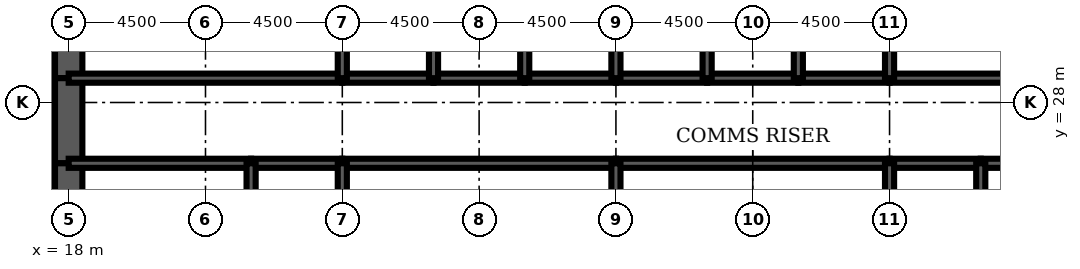
"""IFC4 building model, lengths in metres.
Left out: names, types, materials, properties, quantities, classifications, styles, units other than length and angle.
Written with IfcOpenShell. Run it as: python <this file> out.ifc"""

import sys

from ifc_helpers import new_model, si_unit, direction, frame, frame_2d, origin, place, context, subcontext, project, spatial, rectangle, extrude, element, fill, save


model = new_model("IFC4")
c1 = context("Model", 3, precision=1e-05, world=origin(), true_north=direction((0.0, 1.0)))
c2 = subcontext(c1, "Body", "Model", "MODEL_VIEW")
j1 = project(units=[si_unit("LENGTHUNIT", "METRE"), si_unit("PLANEANGLEUNIT", "RADIAN")], contexts=[c1])
p1 = place(None, origin())
s1 = spatial("IfcSite", under=j1, at=p1, CompositionType="ELEMENT")
p2 = place(p1, origin())
s2 = spatial("IfcBuilding", under=s1, at=p2, CompositionType="ELEMENT")
p3 = place(p2, frame((0.0, 0.0, 167.7)))
s3 = spatial("IfcBuildingStorey", under=s2, at=p3, CompositionType="ELEMENT", Elevation=167.7)
p4 = place(p3, frame((18.0, 32.0, 0.0), z_axis=(0.0, 0.0, 1.0), x_axis=(0.0, -1.0, 0.0)))
e1 = element("IfcWall", 1, at=p4, inside=s3, PredefinedType="SHEAR", context=c2, shape_type="SweptSolid", body=[
    extrude(rectangle(XDim=3.2, YDim=0.9, at=frame_2d((1.6, 0.0))), origin(), (0.0, 0.0, 1.0), 4.2),
])
p5 = place(p3, frame((18.0, 28.8, 0.0), z_axis=(0.0, 0.0, 1.0), x_axis=(0.0, -1.0, 0.0)))
e2 = element("IfcWall", 2, at=p5, inside=s3, PredefinedType="SHEAR", context=c2, shape_type="SweptSolid", body=[
    extrude(rectangle(XDim=2.8, YDim=0.9, at=frame_2d((1.4, 0.0))), origin(), (0.0, 0.0, 1.0), 4.2),
])
p6 = place(p5, frame((0.4, 0.0, 0.0)))
e3 = element("IfcOpeningElement", 3, at=p6, cuts=e2, PredefinedType="OPENING", context=c2, shape_type="SweptSolid", body=[
    extrude(rectangle(XDim=1.8, YDim=2.1, at=frame_2d((0.9, 1.05))), frame((0.0, 0.46, 0.0), z_axis=(0.0, -1.0, 0.0), x_axis=(1.0, 0.0, 0.0)), (0.0, 0.0, 1.0), 0.92),
])
p7 = place(p3, frame((18.0, 26.0, 0.0), z_axis=(0.0, 0.0, 1.0), x_axis=(0.0, -1.0, 0.0)))
e4 = element("IfcWall", 4, at=p7, inside=s3, PredefinedType="SHEAR", context=c2, shape_type="SweptSolid", body=[
    extrude(rectangle(XDim=4.0, YDim=0.9, at=frame_2d((2.0, 0.0))), origin(), (0.0, 0.0, 1.0), 4.2),
])
p8 = place(p3, frame((18.0, 28.8, 0.0), z_axis=(0.0, 0.0, 1.0), x_axis=(1.0, 0.0, 0.0)))
e5 = element("IfcWall", 5, at=p8, inside=s3, PredefinedType="SOLIDWALL", context=c2, shape_type="SweptSolid", body=[
    extrude(rectangle(XDim=9.0, YDim=0.3, at=frame_2d((4.5, 0.0))), origin(), (0.0, 0.0, 1.0), 4.2),
])
p9 = place(p8, frame((0.65, 0.0, 0.0)))
e6 = element("IfcOpeningElement", 6, at=p9, cuts=e5, PredefinedType="OPENING", context=c2, shape_type="SweptSolid", body=[
    extrude(rectangle(XDim=1.0, YDim=2.1, at=frame_2d((0.5, 1.05))), frame((0.0, 0.16, 0.0), z_axis=(0.0, -1.0, 0.0), x_axis=(1.0, 0.0, 0.0)), (0.0, 0.0, 1.0), 0.32),
])
p10 = place(p3, frame((27.0, 28.8, 0.0), z_axis=(0.0, 0.0, 1.0), x_axis=(1.0, 0.0, 0.0)))
e7 = element("IfcWall", 7, at=p10, inside=s3, PredefinedType="SOLIDWALL", context=c2, shape_type="SweptSolid", body=[
    extrude(rectangle(XDim=3.0, YDim=0.3, at=frame_2d((1.5, 0.0))), origin(), (0.0, 0.0, 1.0), 4.2),
])
p11 = place(p10, frame((0.95, 0.0, 0.0)))
e8 = element("IfcOpeningElement", 8, at=p11, cuts=e7, PredefinedType="OPENING", context=c2, shape_type="SweptSolid", body=[
    extrude(rectangle(XDim=1.1, YDim=2.2, at=frame_2d((0.55, 1.1))), frame((0.0, 0.16, 0.0), z_axis=(0.0, -1.0, 0.0), x_axis=(1.0, 0.0, 0.0)), (0.0, 0.0, 1.0), 0.32),
])
p12 = place(p3, frame((30.0, 28.8, 0.0), z_axis=(0.0, 0.0, 1.0), x_axis=(1.0, 0.0, 0.0)))
e9 = element("IfcWall", 9, at=p12, inside=s3, PredefinedType="SOLIDWALL", context=c2, shape_type="SweptSolid", body=[
    extrude(rectangle(XDim=3.0, YDim=0.3, at=frame_2d((1.5, 0.0))), origin(), (0.0, 0.0, 1.0), 4.2),
])
p13 = place(p12, frame((0.95, 0.0, 0.0)))
e10 = element("IfcOpeningElement", 10, at=p13, cuts=e9, PredefinedType="OPENING", context=c2, shape_type="SweptSolid", body=[
    extrude(rectangle(XDim=1.1, YDim=2.2, at=frame_2d((0.55, 1.1))), frame((0.0, 0.16, 0.0), z_axis=(0.0, -1.0, 0.0), x_axis=(1.0, 0.0, 0.0)), (0.0, 0.0, 1.0), 0.32),
])
p14 = place(p3, frame((33.0, 28.8, 0.0), z_axis=(0.0, 0.0, 1.0), x_axis=(1.0, 0.0, 0.0)))
e11 = element("IfcWall", 11, at=p14, inside=s3, PredefinedType="SOLIDWALL", context=c2, shape_type="SweptSolid", body=[
    extrude(rectangle(XDim=3.0, YDim=0.3, at=frame_2d((1.5, 0.0))), origin(), (0.0, 0.0, 1.0), 4.2),
])
p15 = place(p14, frame((0.95, 0.0, 0.0)))
e12 = element("IfcOpeningElement", 12, at=p15, cuts=e11, PredefinedType="OPENING", context=c2, shape_type="SweptSolid", body=[
    extrude(rectangle(XDim=1.1, YDim=2.2, at=frame_2d((0.55, 1.1))), frame((0.0, 0.16, 0.0), z_axis=(0.0, -1.0, 0.0), x_axis=(1.0, 0.0, 0.0)), (0.0, 0.0, 1.0), 0.32),
])
for number, where, z_axis, x_axis in (
    (13, (36.0, 28.8, 0.0), (0.0, 0.0, 1.0), (1.0, 0.0, 0.0)),
    (14, (39.0, 28.8, 0.0), (0.0, 0.0, 1.0), (1.0, 0.0, 0.0)),
):
    element("IfcWall", number, at=place(p3, frame(where, z_axis=z_axis, x_axis=x_axis)), inside=s3, PredefinedType="SOLIDWALL", context=c2, shape_type="SweptSolid", body=[
        extrude(rectangle(XDim=3.0, YDim=0.3, at=frame_2d((1.5, 0.0))), origin(), (0.0, 0.0, 1.0), 4.2),
    ])
p16 = place(p3, frame((42.0, 28.8, 0.0), z_axis=(0.0, 0.0, 1.0), x_axis=(1.0, 0.0, 0.0)))
e15 = element("IfcWall", 15, at=p16, inside=s3, PredefinedType="SOLIDWALL", context=c2, shape_type="SweptSolid", body=[
    extrude(rectangle(XDim=3.0, YDim=0.3, at=frame_2d((1.5, 0.0))), origin(), (0.0, 0.0, 1.0), 4.2),
])
p17 = place(p16, frame((0.95, 0.0, 0.0)))
e16 = element("IfcOpeningElement", 16, at=p17, cuts=e15, PredefinedType="OPENING", context=c2, shape_type="SweptSolid", body=[
    extrude(rectangle(XDim=1.1, YDim=2.2, at=frame_2d((0.55, 1.1))), frame((0.0, 0.16, 0.0), z_axis=(0.0, -1.0, 0.0), x_axis=(1.0, 0.0, 0.0)), (0.0, 0.0, 1.0), 0.32),
])
p18 = place(p3, frame((45.0, 28.8, 0.0), z_axis=(0.0, 0.0, 1.0), x_axis=(1.0, 0.0, 0.0)))
e17 = element("IfcWall", 17, at=p18, inside=s3, PredefinedType="SOLIDWALL", context=c2, shape_type="SweptSolid", body=[
    extrude(rectangle(XDim=9.0, YDim=0.3, at=frame_2d((4.5, 0.0))), origin(), (0.0, 0.0, 1.0), 4.2),
])
p19 = place(p18, frame((7.35, 0.0, 0.0)))
e18 = element("IfcOpeningElement", 18, at=p19, cuts=e17, PredefinedType="OPENING", context=c2, shape_type="SweptSolid", body=[
    extrude(rectangle(XDim=1.0, YDim=2.1, at=frame_2d((0.5, 1.05))), frame((0.0, 0.16, 0.0), z_axis=(0.0, -1.0, 0.0), x_axis=(1.0, 0.0, 0.0)), (0.0, 0.0, 1.0), 0.32),
])
p20 = place(p3, frame((18.0, 26.0, 0.0), z_axis=(0.0, 0.0, 1.0), x_axis=(1.0, 0.0, 0.0)))
e19 = element("IfcWall", 19, at=p20, inside=s3, PredefinedType="SOLIDWALL", context=c2, shape_type="SweptSolid", body=[
    extrude(rectangle(XDim=6.0, YDim=0.3, at=frame_2d((3.0, 0.0))), origin(), (0.0, 0.0, 1.0), 4.2),
])
p21 = place(p3, frame((24.0, 26.0, 0.0), z_axis=(0.0, 0.0, 1.0), x_axis=(1.0, 0.0, 0.0)))
e20 = element("IfcWall", 20, at=p21, inside=s3, PredefinedType="SOLIDWALL", context=c2, shape_type="SweptSolid", body=[
    extrude(rectangle(XDim=3.0, YDim=0.3, at=frame_2d((1.5, 0.0))), origin(), (0.0, 0.0, 1.0), 4.2),
])
for number, where, z_axis, x_axis in (
    (21, (27.0, 26.0, 0.0), (0.0, 0.0, 1.0), (1.0, 0.0, 0.0)),
    (22, (36.0, 26.0, 0.0), (0.0, 0.0, 1.0), (1.0, 0.0, 0.0)),
):
    element("IfcWall", number, at=place(p3, frame(where, z_axis=z_axis, x_axis=x_axis)), inside=s3, PredefinedType="SOLIDWALL", context=c2, shape_type="SweptSolid", body=[
        extrude(rectangle(XDim=9.0, YDim=0.3, at=frame_2d((4.5, 0.0))), origin(), (0.0, 0.0, 1.0), 4.2),
    ])
p22 = place(p3, frame((45.0, 26.0, 0.0), z_axis=(0.0, 0.0, 1.0), x_axis=(1.0, 0.0, 0.0)))
e23 = element("IfcWall", 23, at=p22, inside=s3, PredefinedType="SOLIDWALL", context=c2, shape_type="SweptSolid", body=[
    extrude(rectangle(XDim=3.0, YDim=0.3, at=frame_2d((1.5, 0.0))), origin(), (0.0, 0.0, 1.0), 4.2),
])
p23 = place(p3, frame((48.0, 26.0, 0.0), z_axis=(0.0, 0.0, 1.0), x_axis=(1.0, 0.0, 0.0)))
e24 = element("IfcWall", 24, at=p23, inside=s3, PredefinedType="SOLIDWALL", context=c2, shape_type="SweptSolid", body=[
    extrude(rectangle(XDim=6.0, YDim=0.3, at=frame_2d((3.0, 0.0))), origin(), (0.0, 0.0, 1.0), 4.2),
])
for number, where, z_axis, x_axis in (
    (25, (27.0, 28.8, 0.0), (0.0, 0.0, 1.0), (0.0, 1.0, 0.0)),
    (26, (30.0, 28.8, 0.0), (0.0, 0.0, 1.0), (0.0, 1.0, 0.0)),
    (27, (33.0, 28.8, 0.0), (0.0, 0.0, 1.0), (0.0, 1.0, 0.0)),
    (28, (36.0, 28.8, 0.0), (0.0, 0.0, 1.0), (0.0, 1.0, 0.0)),
    (29, (39.0, 28.8, 0.0), (0.0, 0.0, 1.0), (0.0, 1.0, 0.0)),
    (30, (42.0, 28.8, 0.0), (0.0, 0.0, 1.0), (0.0, 1.0, 0.0)),
    (31, (45.0, 28.8, 0.0), (0.0, 0.0, 1.0), (0.0, 1.0, 0.0)),
):
    element("IfcWall", number, at=place(p3, frame(where, z_axis=z_axis, x_axis=x_axis)), inside=s3, PredefinedType="SOLIDWALL", context=c2, shape_type="SweptSolid", body=[
        extrude(rectangle(XDim=3.2, YDim=0.3, at=frame_2d((1.6, 0.0))), origin(), (0.0, 0.0, 1.0), 4.2),
    ])
for number, where, z_axis, x_axis in (
    (32, (24.0, 22.0, 0.0), (0.0, 0.0, 1.0), (0.0, 1.0, 0.0)),
    (33, (27.0, 22.0, 0.0), (0.0, 0.0, 1.0), (0.0, 1.0, 0.0)),
    (34, (36.0, 22.0, 0.0), (0.0, 0.0, 1.0), (0.0, 1.0, 0.0)),
    (35, (45.0, 22.0, 0.0), (0.0, 0.0, 1.0), (0.0, 1.0, 0.0)),
    (36, (48.0, 22.0, 0.0), (0.0, 0.0, 1.0), (0.0, 1.0, 0.0)),
):
    element("IfcWall", number, at=place(p3, frame(where, z_axis=z_axis, x_axis=x_axis)), inside=s3, PredefinedType="SOLIDWALL", context=c2, shape_type="SweptSolid", body=[
        extrude(rectangle(XDim=4.0, YDim=0.3, at=frame_2d((2.0, 0.0))), origin(), (0.0, 0.0, 1.0), 4.2),
    ])
p24 = place(p3, frame((38.5, 22.15, 0.0), z_axis=(0.0, 0.0, 1.0), x_axis=(0.0, 1.0, 0.0)))
e37 = element("IfcWall", 37, at=p24, inside=s3, PredefinedType="PARTITIONING", context=c2, shape_type="SweptSolid", body=[
    extrude(rectangle(XDim=3.7, YDim=0.15, at=frame_2d((1.85, 0.0))), origin(), (0.0, 0.0, 1.0), 3.0),
])
p25 = place(p24, frame((2.2, 0.0, 0.0)))
e38 = element("IfcOpeningElement", 38, at=p25, cuts=e37, PredefinedType="OPENING", context=c2, shape_type="SweptSolid", body=[
    extrude(rectangle(XDim=1.0, YDim=2.1, at=frame_2d((0.5, 1.05))), frame((0.0, 0.085, 0.0), z_axis=(0.0, -1.0, 0.0), x_axis=(1.0, 0.0, 0.0)), (0.0, 0.0, 1.0), 0.17),
])
p26 = place(p3, frame((20.625, 22.15, 0.0), z_axis=(0.0, 0.0, 1.0), x_axis=(0.0, 1.0, 0.0)))
e39 = element("IfcWall", 39, at=p26, inside=s3, PredefinedType="PARTITIONING", context=c2, shape_type="SweptSolid", body=[
    extrude(rectangle(XDim=3.7, YDim=0.15, at=frame_2d((1.85, 0.0))), origin(), (0.0, 0.0, 1.0), 3.0),
])
p27 = place(p3, frame((47.7, 26.15, 0.0), z_axis=(0.0, 0.0, 1.0), x_axis=(0.0, 1.0, 0.0)))
e40 = element("IfcWall", 40, at=p27, inside=s3, PredefinedType="PARTITIONING", context=c2, shape_type="SweptSolid", body=[
    extrude(rectangle(XDim=2.5, YDim=0.15, at=frame_2d((1.25, 0.0))), origin(), (0.0, 0.0, 1.0), 3.0),
])
p28 = place(p27, frame((1.15, 0.0, 0.0)))
e41 = element("IfcOpeningElement", 41, at=p28, cuts=e40, PredefinedType="OPENING", context=c2, shape_type="SweptSolid", body=[
    extrude(rectangle(XDim=1.0, YDim=2.1, at=frame_2d((0.5, 1.05))), frame((0.0, 0.085, 0.0), z_axis=(0.0, -1.0, 0.0), x_axis=(1.0, 0.0, 0.0)), (0.0, 0.0, 1.0), 0.17),
])
p29 = place(p25, origin())
e42 = element("IfcDoor", 42, at=p29, inside=s3, OperationType="SINGLE_SWING_RIGHT", PredefinedType="DOOR", context=c2, shape_type="SweptSolid", body=[
    extrude(rectangle(XDim=1.0, YDim=2.1, at=frame_2d((0.5, 1.05))), frame((0.0, 0.025, 0.0), z_axis=(0.0, -1.0, 0.0), x_axis=(1.0, 0.0, 0.0)), (0.0, 0.0, 1.0), 0.05),
])
fill(e38, e42)
p30 = place(p28, origin())
e43 = element("IfcDoor", 43, at=p30, inside=s3, OperationType="SINGLE_SWING_RIGHT", PredefinedType="DOOR", context=c2, shape_type="SweptSolid", body=[
    extrude(rectangle(XDim=1.0, YDim=2.1, at=frame_2d((0.5, 1.05))), frame((0.0, 0.025, 0.0), z_axis=(0.0, -1.0, 0.0), x_axis=(1.0, 0.0, 0.0)), (0.0, 0.0, 1.0), 0.05),
])
fill(e41, e43)
p31 = place(p17, origin())
e44 = element("IfcDoor", 44, at=p31, inside=s3, OperationType="DOUBLE_DOOR_SLIDING", PredefinedType="USERDEFINED", context=c2, shape_type="SweptSolid", body=[
    extrude(rectangle(XDim=1.1, YDim=2.2, at=frame_2d((0.55, 1.1))), frame((0.0, 0.025, 0.0), z_axis=(0.0, -1.0, 0.0), x_axis=(1.0, 0.0, 0.0)), (0.0, 0.0, 1.0), 0.05),
])
fill(e16, e44)
p32 = place(p11, origin())
e45 = element("IfcDoor", 45, at=p32, inside=s3, OperationType="DOUBLE_DOOR_SLIDING", PredefinedType="USERDEFINED", context=c2, shape_type="SweptSolid", body=[
    extrude(rectangle(XDim=1.1, YDim=2.2, at=frame_2d((0.55, 1.1))), frame((0.0, 0.025, 0.0), z_axis=(0.0, -1.0, 0.0), x_axis=(1.0, 0.0, 0.0)), (0.0, 0.0, 1.0), 0.05),
])
fill(e8, e45)
p33 = place(p13, origin())
e46 = element("IfcDoor", 46, at=p33, inside=s3, OperationType="DOUBLE_DOOR_SLIDING", PredefinedType="USERDEFINED", context=c2, shape_type="SweptSolid", body=[
    extrude(rectangle(XDim=1.1, YDim=2.2, at=frame_2d((0.55, 1.1))), frame((0.0, 0.025, 0.0), z_axis=(0.0, -1.0, 0.0), x_axis=(1.0, 0.0, 0.0)), (0.0, 0.0, 1.0), 0.05),
])
fill(e10, e46)
p34 = place(p15, origin())
e47 = element("IfcDoor", 47, at=p34, inside=s3, OperationType="DOUBLE_DOOR_SLIDING", PredefinedType="USERDEFINED", context=c2, shape_type="SweptSolid", body=[
    extrude(rectangle(XDim=1.1, YDim=2.2, at=frame_2d((0.55, 1.1))), frame((0.0, 0.025, 0.0), z_axis=(0.0, -1.0, 0.0), x_axis=(1.0, 0.0, 0.0)), (0.0, 0.0, 1.0), 0.05),
])
fill(e12, e47)
p35 = place(p9, origin())
e48 = element("IfcDoor", 48, at=p35, inside=s3, OperationType="SINGLE_SWING_LEFT", PredefinedType="DOOR", context=c2, shape_type="SweptSolid", body=[
    extrude(rectangle(XDim=1.0, YDim=2.1, at=frame_2d((0.5, 1.05))), frame((0.0, 0.025, 0.0), z_axis=(0.0, -1.0, 0.0), x_axis=(1.0, 0.0, 0.0)), (0.0, 0.0, 1.0), 0.05),
])
fill(e6, e48)
p36 = place(p6, origin())
e49 = element("IfcDoor", 49, at=p36, inside=s3, OperationType="SINGLE_SWING_LEFT", PredefinedType="DOOR", context=c2, shape_type="SweptSolid", body=[
    extrude(rectangle(XDim=1.8, YDim=2.1, at=frame_2d((0.9, 1.05))), frame((0.0, 0.45, 0.0), z_axis=(0.0, -1.0, 0.0), x_axis=(1.0, 0.0, 0.0)), (0.0, 0.0, 1.0), 0.899),
])
fill(e3, e49)
save(model, sys.argv[1])
